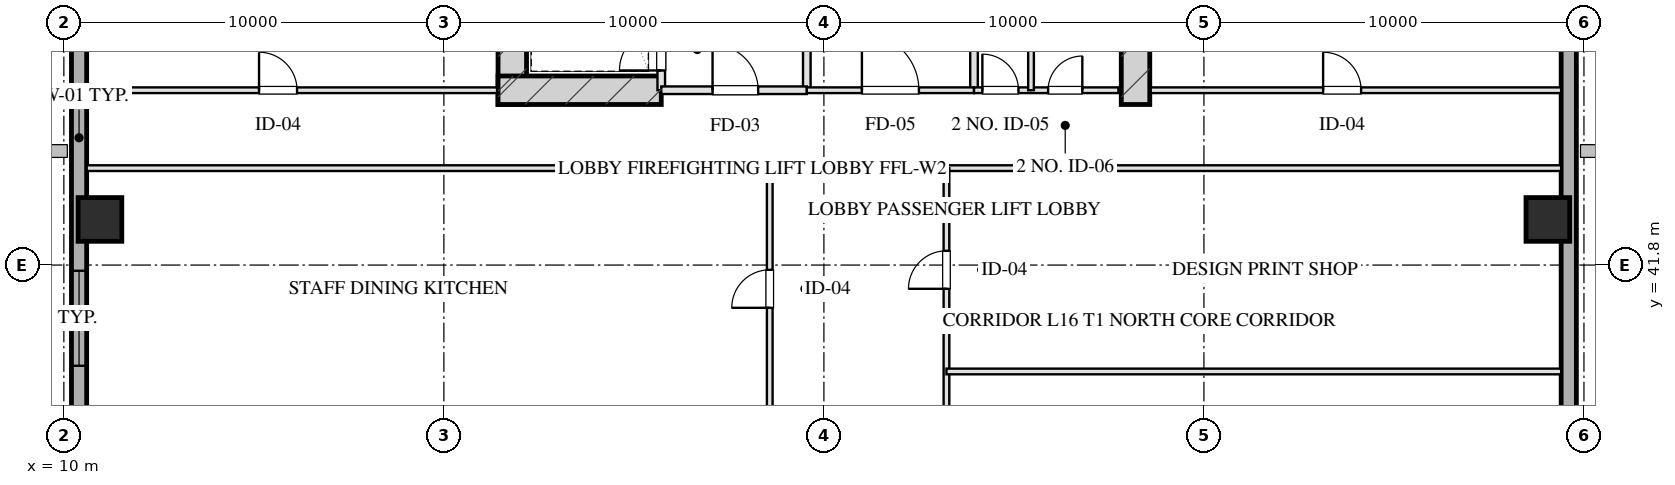
"""IFC4 building model, lengths in metres.
Left out: names, types, materials, properties, quantities, classifications, styles, units other than length and angle.
Written with IfcOpenShell. Run it as: python <this file> out.ifc"""

import sys

from ifc_helpers import new_model, si_unit, direction, frame, frame_2d, origin, origin_2d, place, context, subcontext, project, spatial, rectangle, hollow_rectangle, extrude, element, fill, save


model = new_model("IFC4")
c1 = context("Model", 3, precision=1e-05, world=origin(), true_north=direction((0.0, 1.0)))
c2 = subcontext(c1, "Body", "Model", "MODEL_VIEW")
j1 = project(units=[si_unit("LENGTHUNIT", "METRE"), si_unit("PLANEANGLEUNIT", "RADIAN")], contexts=[c1])
p1 = place(None, origin())
s1 = spatial("IfcSite", under=j1, at=p1, CompositionType="ELEMENT")
p2 = place(p1, origin())
s2 = spatial("IfcBuilding", under=s1, at=p2, CompositionType="ELEMENT")
p3 = place(p2, frame((0.0, 0.0, 67.85)))
s3 = spatial("IfcBuildingStorey", under=s2, at=p3, CompositionType="ELEMENT", Elevation=67.85)
for number, where, z_axis, x_axis in (
    (1, (21.8, 46.025, 0.0), (0.0, 0.0, 1.0), (0.0, 1.0, 0.0)),
    (2, (38.2, 46.025, 0.0), (0.0, 0.0, 1.0), (0.0, 1.0, 0.0)),
):
    element("IfcWall", number, at=place(p3, frame(where, z_axis=z_axis, x_axis=x_axis)), inside=s3, PredefinedType="SHEAR", context=c2, shape_type="SweptSolid", body=[
        extrude(rectangle(XDim=9.63, YDim=0.75, at=frame_2d((4.815, 0.0))), origin(), (0.0, 0.0, 1.0), 3.45),
    ])
p4 = place(p3, frame((21.425, 46.4, 0.0), z_axis=(0.0, 0.0, 1.0), x_axis=(1.0, 0.0, 0.0)))
e3 = element("IfcWall", 3, at=p4, inside=s3, PredefinedType="SHEAR", context=c2, shape_type="SweptSolid", body=[
    extrude(rectangle(XDim=4.295, YDim=0.75, at=frame_2d((2.147, 0.0))), origin(), (0.0, 0.0, 1.0), 3.45),
])
for number, where, z_axis, x_axis in (
    (4, (10.95, 43.0, 0.0), (0.0, 0.0, 1.0), (1.0, 0.0, 0.0)),
    (5, (49.05, 43.0, 0.0), (0.0, 0.0, 1.0), (1.0, 0.0, 0.0)),
):
    element("IfcColumn", number, at=place(p3, frame(where, z_axis=z_axis, x_axis=x_axis)), inside=s3, PredefinedType="COLUMN", context=c2, shape_type="SweptSolid", body=[
        extrude(hollow_rectangle(XDim=1.15, YDim=1.15, WallThickness=0.04, at=origin_2d()), origin(), (0.0, 0.0, 1.0), 3.451),
    ])
p5 = place(p3, frame((10.4, 7.2, 0.0), z_axis=(0.0, 0.0, 1.0), x_axis=(0.0, 1.0, 0.0)))
e6 = element("IfcWall", 6, at=p5, inside=s3, PredefinedType="SOLIDWALL", context=c2, shape_type="SweptSolid", body=[
    extrude(rectangle(XDim=53.6, YDim=0.4, at=frame_2d((26.8, 0.0))), origin(), (0.0, 0.0, 1.0), 2.61),
])
p6 = place(p5, frame((31.95, 0.0, 0.75)))
e7 = element("IfcOpeningElement", 7, at=p6, cuts=e6, PredefinedType="OPENING", context=c2, shape_type="SweptSolid", body=[
    extrude(rectangle(XDim=2.5, YDim=1.46, at=frame_2d((1.25, 0.73))), frame((0.0, 0.21, 0.0), z_axis=(0.0, -1.0, 0.0), x_axis=(1.0, 0.0, 0.0)), (0.0, 0.0, 1.0), 0.42),
])
p7 = place(p5, frame((20.45, 0.0, 0.0)))
e8 = element("IfcOpeningElement", 8, at=p7, cuts=e6, PredefinedType="OPENING", context=c2, shape_type="SweptSolid", body=[
    extrude(rectangle(XDim=1.1, YDim=2.15, at=frame_2d((0.55, 1.075))), frame((0.0, 0.21, 0.0), z_axis=(0.0, -1.0, 0.0), x_axis=(1.0, 0.0, 0.0)), (0.0, 0.0, 1.0), 0.42),
])
p8 = place(p3, frame((49.6, 60.8, 0.0), z_axis=(0.0, 0.0, 1.0), x_axis=(0.0, -1.0, 0.0)))
e9 = element("IfcWall", 9, at=p8, inside=s3, PredefinedType="SOLIDWALL", context=c2, shape_type="SweptSolid", body=[
    extrude(rectangle(XDim=53.6, YDim=0.4, at=frame_2d((26.8, 0.0))), origin(), (0.0, 0.0, 1.0), 2.61),
])
p9 = place(p8, frame((22.95, 0.0, 0.75)))
e10 = element("IfcOpeningElement", 10, at=p9, cuts=e9, PredefinedType="OPENING", context=c2, shape_type="SweptSolid", body=[
    extrude(rectangle(XDim=2.5, YDim=1.46, at=frame_2d((1.25, 0.73))), frame((0.0, 0.21, 0.0), z_axis=(0.0, -1.0, 0.0), x_axis=(1.0, 0.0, 0.0)), (0.0, 0.0, 1.0), 0.42),
])
p10 = place(p8, frame((29.35, 0.0, 0.0)))
e11 = element("IfcOpeningElement", 11, at=p10, cuts=e9, PredefinedType="OPENING", context=c2, shape_type="SweptSolid", body=[
    extrude(rectangle(XDim=1.1, YDim=2.15, at=frame_2d((0.55, 1.075))), frame((0.0, 0.21, 0.0), z_axis=(0.0, -1.0, 0.0), x_axis=(1.0, 0.0, 0.0)), (0.0, 0.0, 1.0), 0.42),
])
p11 = place(p3, frame((25.72, 46.4, 0.0), z_axis=(0.0, 0.0, 1.0), x_axis=(0.0, 1.0, 0.0)))
e12 = element("IfcWall", 12, at=p11, inside=s3, PredefinedType="PARTITIONING", context=c2, shape_type="SweptSolid", body=[
    extrude(rectangle(XDim=1.9, YDim=0.2, at=frame_2d((0.95, 0.0))), origin(), (0.0, 0.0, 1.0), 3.175),
])
p12 = place(p11, frame((0.52, 0.0, 0.0)))
e13 = element("IfcOpeningElement", 13, at=p12, cuts=e12, PredefinedType="OPENING", context=c2, shape_type="SweptSolid", body=[
    extrude(rectangle(XDim=1.1, YDim=2.05, at=frame_2d((0.55, 1.025))), frame((0.0, 0.11, 0.0), z_axis=(0.0, -1.0, 0.0), x_axis=(1.0, 0.0, 0.0)), (0.0, 0.0, 1.0), 0.22),
])
p13 = place(p3, frame((29.55, 46.4, 0.0), z_axis=(0.0, 0.0, 1.0), x_axis=(0.0, 1.0, 0.0)))
e14 = element("IfcWall", 14, at=p13, inside=s3, PredefinedType="PARTITIONING", context=c2, shape_type="SweptSolid", body=[
    extrude(rectangle(XDim=8.43, YDim=0.2, at=frame_2d((4.215, 0.0))), origin(), (0.0, 0.0, 1.0), 3.175),
])
p14 = place(p3, frame((25.72, 46.4, 0.0), z_axis=(0.0, 0.0, 1.0), x_axis=(1.0, 0.0, 0.0)))
e15 = element("IfcWall", 15, at=p14, inside=s3, PredefinedType="PARTITIONING", context=c2, shape_type="SweptSolid", body=[
    extrude(rectangle(XDim=3.83, YDim=0.2, at=frame_2d((1.915, 0.0))), origin(), (0.0, 0.0, 1.0), 3.175),
])
p15 = place(p14, frame((1.35, 0.0, 0.0)))
e16 = element("IfcOpeningElement", 16, at=p15, cuts=e15, PredefinedType="OPENING", context=c2, shape_type="SweptSolid", body=[
    extrude(rectangle(XDim=1.2, YDim=2.05, at=frame_2d((0.6, 1.025))), frame((0.0, 0.11, 0.0), z_axis=(0.0, -1.0, 0.0), x_axis=(1.0, 0.0, 0.0)), (0.0, 0.0, 1.0), 0.22),
])
p16 = place(p3, frame((33.95, 46.4, 0.0), z_axis=(0.0, 0.0, 1.0), x_axis=(0.0, 1.0, 0.0)))
e17 = element("IfcWall", 17, at=p16, inside=s3, PredefinedType="PARTITIONING", context=c2, shape_type="SweptSolid", body=[
    extrude(rectangle(XDim=8.43, YDim=0.2, at=frame_2d((4.215, 0.0))), origin(), (0.0, 0.0, 1.0), 3.175),
])
p17 = place(p3, frame((29.55, 46.4, 0.0), z_axis=(0.0, 0.0, 1.0), x_axis=(1.0, 0.0, 0.0)))
e18 = element("IfcWall", 18, at=p17, inside=s3, PredefinedType="PARTITIONING", context=c2, shape_type="SweptSolid", body=[
    extrude(rectangle(XDim=4.4, YDim=0.15, at=frame_2d((2.2, 0.0))), origin(), (0.0, 0.0, 1.0), 3.175),
])
p18 = place(p17, frame((1.45, 0.0, 0.0)))
e19 = element("IfcOpeningElement", 19, at=p18, cuts=e18, PredefinedType="OPENING", context=c2, shape_type="SweptSolid", body=[
    extrude(rectangle(XDim=1.5, YDim=2.05, at=frame_2d((0.75, 1.025))), frame((0.0, 0.085, 0.0), z_axis=(0.0, -1.0, 0.0), x_axis=(1.0, 0.0, 0.0)), (0.0, 0.0, 1.0), 0.17),
])
p19 = place(p3, frame((33.95, 46.4, 0.0), z_axis=(0.0, 0.0, 1.0), x_axis=(1.0, 0.0, 0.0)))
e20 = element("IfcWall", 20, at=p19, inside=s3, PredefinedType="PARTITIONING", context=c2, shape_type="SweptSolid", body=[
    extrude(rectangle(XDim=3.8, YDim=0.15, at=frame_2d((1.9, 0.0))), origin(), (0.0, 0.0, 1.0), 3.175),
])
p20 = place(p19, frame((0.22, 0.0, 0.0)))
e21 = element("IfcOpeningElement", 21, at=p20, cuts=e20, PredefinedType="OPENING", context=c2, shape_type="SweptSolid", body=[
    extrude(rectangle(XDim=0.95, YDim=2.05, at=frame_2d((0.475, 1.025))), frame((0.0, 0.085, 0.0), z_axis=(0.0, -1.0, 0.0), x_axis=(1.0, 0.0, 0.0)), (0.0, 0.0, 1.0), 0.17),
])
p21 = place(p19, frame((1.95, 0.0, 0.0)))
e22 = element("IfcOpeningElement", 22, at=p21, cuts=e20, PredefinedType="OPENING", context=c2, shape_type="SweptSolid", body=[
    extrude(rectangle(XDim=0.9, YDim=2.05, at=frame_2d((0.45, 1.025))), frame((0.0, 0.085, 0.0), z_axis=(0.0, -1.0, 0.0), x_axis=(1.0, 0.0, 0.0)), (0.0, 0.0, 1.0), 0.17),
])
p22 = place(p3, frame((35.45, 46.4, 0.0), z_axis=(0.0, 0.0, 1.0), x_axis=(0.0, 1.0, 0.0)))
e23 = element("IfcWall", 23, at=p22, inside=s3, PredefinedType="PARTITIONING", context=c2, shape_type="SweptSolid", body=[
    extrude(rectangle(XDim=8.43, YDim=0.15, at=frame_2d((4.215, 0.0))), origin(), (0.0, 0.0, 1.0), 2.765),
])
p23 = place(p22, frame((2.55, 0.0, 0.0)))
e24 = element("IfcOpeningElement", 24, at=p23, cuts=e23, PredefinedType="OPENING", context=c2, shape_type="SweptSolid", body=[
    extrude(rectangle(XDim=0.95, YDim=2.05, at=frame_2d((0.475, 1.025))), frame((0.0, 0.085, 0.0), z_axis=(0.0, -1.0, 0.0), x_axis=(1.0, 0.0, 0.0)), (0.0, 0.0, 1.0), 0.17),
])
p24 = place(p22, frame((5.6, 0.0, 0.0)))
e25 = element("IfcOpeningElement", 25, at=p24, cuts=e23, PredefinedType="OPENING", context=c2, shape_type="SweptSolid", body=[
    extrude(rectangle(XDim=0.9, YDim=2.05, at=frame_2d((0.45, 1.025))), frame((0.0, 0.085, 0.0), z_axis=(0.0, -1.0, 0.0), x_axis=(1.0, 0.0, 0.0)), (0.0, 0.0, 1.0), 0.17),
])
p25 = place(p3, frame((10.6, 46.4, 0.0), z_axis=(0.0, 0.0, 1.0), x_axis=(1.0, 0.0, 0.0)))
e26 = element("IfcWall", 26, at=p25, inside=s3, PredefinedType="PARTITIONING", context=c2, shape_type="SweptSolid", body=[
    extrude(rectangle(XDim=10.8, YDim=0.15, at=frame_2d((5.4, 0.0))), origin(), (0.0, 0.0, 1.0), 3.175),
])
p26 = place(p25, frame((4.536, 0.0, 0.0)))
e27 = element("IfcOpeningElement", 27, at=p26, cuts=e26, PredefinedType="OPENING", context=c2, shape_type="SweptSolid", body=[
    extrude(rectangle(XDim=1.0, YDim=2.05, at=frame_2d((0.5, 1.025))), frame((0.0, 0.085, 0.0), z_axis=(0.0, -1.0, 0.0), x_axis=(1.0, 0.0, 0.0)), (0.0, 0.0, 1.0), 0.17),
])
p27 = place(p3, frame((38.6, 46.4, 0.0), z_axis=(0.0, 0.0, 1.0), x_axis=(1.0, 0.0, 0.0)))
e28 = element("IfcWall", 28, at=p27, inside=s3, PredefinedType="PARTITIONING", context=c2, shape_type="SweptSolid", body=[
    extrude(rectangle(XDim=10.8, YDim=0.15, at=frame_2d((5.4, 0.0))), origin(), (0.0, 0.0, 1.0), 3.175),
])
p28 = place(p27, frame((4.536, 0.0, 0.0)))
e29 = element("IfcOpeningElement", 29, at=p28, cuts=e28, PredefinedType="OPENING", context=c2, shape_type="SweptSolid", body=[
    extrude(rectangle(XDim=1.0, YDim=2.05, at=frame_2d((0.5, 1.025))), frame((0.0, 0.085, 0.0), z_axis=(0.0, -1.0, 0.0), x_axis=(1.0, 0.0, 0.0)), (0.0, 0.0, 1.0), 0.17),
])
p29 = place(p3, frame((10.6, 44.35, 0.0), z_axis=(0.0, 0.0, 1.0), x_axis=(1.0, 0.0, 0.0)))
e30 = element("IfcWall", 30, at=p29, inside=s3, PredefinedType="PARTITIONING", context=c2, shape_type="SweptSolid", body=[
    extrude(rectangle(XDim=17.975, YDim=0.15, at=frame_2d((8.987, 0.0))), origin(), (0.0, 0.0, 1.0), 3.175),
])
p30 = place(p3, frame((33.225, 44.35, 0.0), z_axis=(0.0, 0.0, 1.0), x_axis=(1.0, 0.0, 0.0)))
e31 = element("IfcWall", 31, at=p30, inside=s3, PredefinedType="PARTITIONING", context=c2, shape_type="SweptSolid", body=[
    extrude(rectangle(XDim=16.175, YDim=0.15, at=frame_2d((8.087, 0.0))), origin(), (0.0, 0.0, 1.0), 3.175),
])
p31 = place(p3, frame((28.575, 23.65, 0.0), z_axis=(0.0, 0.0, 1.0), x_axis=(0.0, 1.0, 0.0)))
e32 = element("IfcWall", 32, at=p31, inside=s3, PredefinedType="PARTITIONING", context=c2, shape_type="SweptSolid", body=[
    extrude(rectangle(XDim=20.7, YDim=0.15, at=frame_2d((10.35, 0.0))), origin(), (0.0, 0.0, 1.0), 3.175),
])
p32 = place(p31, frame((2.675, 0.0, 0.0)))
e33 = element("IfcOpeningElement", 33, at=p32, cuts=e32, PredefinedType="OPENING", context=c2, shape_type="SweptSolid", body=[
    extrude(rectangle(XDim=1.0, YDim=2.05, at=frame_2d((0.5, 1.025))), frame((0.0, 0.085, 0.0), z_axis=(0.0, -1.0, 0.0), x_axis=(1.0, 0.0, 0.0)), (0.0, 0.0, 1.0), 0.17),
])
p33 = place(p31, frame((9.85, 0.0, 0.0)))
e34 = element("IfcOpeningElement", 34, at=p33, cuts=e32, PredefinedType="OPENING", context=c2, shape_type="SweptSolid", body=[
    extrude(rectangle(XDim=1.05, YDim=2.05, at=frame_2d((0.525, 1.025))), frame((0.0, 0.085, 0.0), z_axis=(0.0, -1.0, 0.0), x_axis=(1.0, 0.0, 0.0)), (0.0, 0.0, 1.0), 0.17),
])
p34 = place(p31, frame((17.025, 0.0, 0.0)))
e35 = element("IfcOpeningElement", 35, at=p34, cuts=e32, PredefinedType="OPENING", context=c2, shape_type="SweptSolid", body=[
    extrude(rectangle(XDim=1.0, YDim=2.05, at=frame_2d((0.5, 1.025))), frame((0.0, 0.085, 0.0), z_axis=(0.0, -1.0, 0.0), x_axis=(1.0, 0.0, 0.0)), (0.0, 0.0, 1.0), 0.17),
])
p35 = place(p3, frame((33.225, 23.65, 0.0), z_axis=(0.0, 0.0, 1.0), x_axis=(0.0, 1.0, 0.0)))
e36 = element("IfcWall", 36, at=p35, inside=s3, PredefinedType="PARTITIONING", context=c2, shape_type="SweptSolid", body=[
    extrude(rectangle(XDim=20.7, YDim=0.15, at=frame_2d((10.35, 0.0))), origin(), (0.0, 0.0, 1.0), 3.175),
])
p36 = place(p35, frame((2.175, 0.0, 0.0)))
e37 = element("IfcOpeningElement", 37, at=p36, cuts=e36, PredefinedType="OPENING", context=c2, shape_type="SweptSolid", body=[
    extrude(rectangle(XDim=1.0, YDim=2.05, at=frame_2d((0.5, 1.025))), frame((0.0, 0.085, 0.0), z_axis=(0.0, -1.0, 0.0), x_axis=(1.0, 0.0, 0.0)), (0.0, 0.0, 1.0), 0.17),
])
p37 = place(p35, frame((7.69, 0.0, 0.0)))
e38 = element("IfcOpeningElement", 38, at=p37, cuts=e36, PredefinedType="OPENING", context=c2, shape_type="SweptSolid", body=[
    extrude(rectangle(XDim=0.85, YDim=2.05, at=frame_2d((0.425, 1.025))), frame((0.0, 0.085, 0.0), z_axis=(0.0, -1.0, 0.0), x_axis=(1.0, 0.0, 0.0)), (0.0, 0.0, 1.0), 0.17),
])
p38 = place(p35, frame((12.69, 0.0, 0.0)))
e39 = element("IfcOpeningElement", 39, at=p38, cuts=e36, PredefinedType="OPENING", context=c2, shape_type="SweptSolid", body=[
    extrude(rectangle(XDim=1.0, YDim=2.05, at=frame_2d((0.5, 1.025))), frame((0.0, 0.085, 0.0), z_axis=(0.0, -1.0, 0.0), x_axis=(1.0, 0.0, 0.0)), (0.0, 0.0, 1.0), 0.17),
])
p39 = place(p35, frame((17.525, 0.0, 0.0)))
e40 = element("IfcOpeningElement", 40, at=p39, cuts=e36, PredefinedType="OPENING", context=c2, shape_type="SweptSolid", body=[
    extrude(rectangle(XDim=1.0, YDim=2.05, at=frame_2d((0.5, 1.025))), frame((0.0, 0.085, 0.0), z_axis=(0.0, -1.0, 0.0), x_axis=(1.0, 0.0, 0.0)), (0.0, 0.0, 1.0), 0.17),
])
p40 = place(p3, frame((33.225, 39.0, 0.0), z_axis=(0.0, 0.0, 1.0), x_axis=(1.0, 0.0, 0.0)))
e41 = element("IfcWall", 41, at=p40, inside=s3, PredefinedType="PARTITIONING", context=c2, shape_type="SweptSolid", body=[
    extrude(rectangle(XDim=16.175, YDim=0.15, at=frame_2d((8.087, 0.0))), origin(), (0.0, 0.0, 1.0), 3.175),
])
p41 = place(p6, origin())
e42 = element("IfcWindow", 42, at=p41, inside=s3, PartitioningType="TRIPLE_PANEL_VERTICAL", PredefinedType="WINDOW", context=c2, shape_type="SweptSolid", body=[
    extrude(rectangle(XDim=2.5, YDim=1.46, at=frame_2d((1.25, 0.73))), frame((0.0, 0.03, 0.0), z_axis=(0.0, -1.0, 0.0), x_axis=(1.0, 0.0, 0.0)), (0.0, 0.0, 1.0), 0.06),
])
fill(e7, e42)
p42 = place(p12, origin())
e43 = element("IfcDoor", 43, at=p42, inside=s3, OperationType="SINGLE_SWING_LEFT", PredefinedType="DOOR", context=c2, shape_type="SweptSolid", body=[
    extrude(rectangle(XDim=1.1, YDim=2.05, at=frame_2d((0.55, 1.025))), frame((0.0, 0.025, 0.0), z_axis=(0.0, -1.0, 0.0), x_axis=(1.0, 0.0, 0.0)), (0.0, 0.0, 1.0), 0.05),
])
fill(e13, e43)
p43 = place(p15, origin())
e44 = element("IfcDoor", 44, at=p43, inside=s3, OperationType="SINGLE_SWING_LEFT", PredefinedType="DOOR", context=c2, shape_type="SweptSolid", body=[
    extrude(rectangle(XDim=1.2, YDim=2.05, at=frame_2d((0.6, 1.025))), frame((0.0, 0.025, 0.0), z_axis=(0.0, -1.0, 0.0), x_axis=(1.0, 0.0, 0.0)), (0.0, 0.0, 1.0), 0.05),
])
fill(e16, e44)
p44 = place(p18, origin())
e45 = element("IfcDoor", 45, at=p44, inside=s3, OperationType="SINGLE_SWING_LEFT", PredefinedType="DOOR", context=c2, shape_type="SweptSolid", body=[
    extrude(rectangle(XDim=1.5, YDim=2.05, at=frame_2d((0.75, 1.025))), frame((0.0, 0.025, 0.0), z_axis=(0.0, -1.0, 0.0), x_axis=(1.0, 0.0, 0.0)), (0.0, 0.0, 1.0), 0.05),
])
fill(e19, e45)
p45 = place(p20, origin())
e46 = element("IfcDoor", 46, at=p45, inside=s3, OperationType="SINGLE_SWING_LEFT", PredefinedType="DOOR", context=c2, shape_type="SweptSolid", body=[
    extrude(rectangle(XDim=0.95, YDim=2.05, at=frame_2d((0.475, 1.025))), frame((0.0, 0.025, 0.0), z_axis=(0.0, -1.0, 0.0), x_axis=(1.0, 0.0, 0.0)), (0.0, 0.0, 1.0), 0.05),
])
fill(e21, e46)
p46 = place(p21, origin())
e47 = element("IfcDoor", 47, at=p46, inside=s3, OperationType="SINGLE_SWING_RIGHT", PredefinedType="DOOR", context=c2, shape_type="SweptSolid", body=[
    extrude(rectangle(XDim=0.9, YDim=2.05, at=frame_2d((0.45, 1.025))), frame((0.0, 0.025, 0.0), z_axis=(0.0, -1.0, 0.0), x_axis=(1.0, 0.0, 0.0)), (0.0, 0.0, 1.0), 0.05),
])
fill(e22, e47)
p47 = place(p26, origin())
e48 = element("IfcDoor", 48, at=p47, inside=s3, OperationType="SINGLE_SWING_LEFT", PredefinedType="DOOR", context=c2, shape_type="SweptSolid", body=[
    extrude(rectangle(XDim=1.0, YDim=2.05, at=frame_2d((0.5, 1.025))), frame((0.0, 0.025, 0.0), z_axis=(0.0, -1.0, 0.0), x_axis=(1.0, 0.0, 0.0)), (0.0, 0.0, 1.0), 0.05),
])
fill(e27, e48)
p48 = place(p28, origin())
e49 = element("IfcDoor", 49, at=p48, inside=s3, OperationType="SINGLE_SWING_LEFT", PredefinedType="DOOR", context=c2, shape_type="SweptSolid", body=[
    extrude(rectangle(XDim=1.0, YDim=2.05, at=frame_2d((0.5, 1.025))), frame((0.0, 0.025, 0.0), z_axis=(0.0, -1.0, 0.0), x_axis=(1.0, 0.0, 0.0)), (0.0, 0.0, 1.0), 0.05),
])
fill(e29, e49)
p49 = place(p34, origin())
e50 = element("IfcDoor", 50, at=p49, inside=s3, OperationType="SINGLE_SWING_LEFT", PredefinedType="DOOR", context=c2, shape_type="SweptSolid", body=[
    extrude(rectangle(XDim=1.0, YDim=2.05, at=frame_2d((0.5, 1.025))), frame((0.0, 0.025, 0.0), z_axis=(0.0, -1.0, 0.0), x_axis=(1.0, 0.0, 0.0)), (0.0, 0.0, 1.0), 0.05),
])
fill(e35, e50)
p50 = place(p39, origin())
e51 = element("IfcDoor", 51, at=p50, inside=s3, OperationType="SINGLE_SWING_LEFT", PredefinedType="DOOR", context=c2, shape_type="SweptSolid", body=[
    extrude(rectangle(XDim=1.0, YDim=2.05, at=frame_2d((0.5, 1.025))), frame((0.0, 0.025, 0.0), z_axis=(0.0, -1.0, 0.0), x_axis=(1.0, 0.0, 0.0)), (0.0, 0.0, 1.0), 0.05),
])
fill(e40, e51)
save(model, sys.argv[1])
